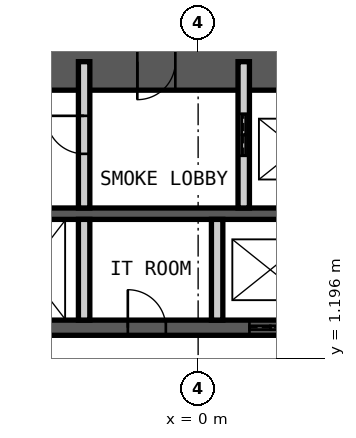
"""IFC4 building model, lengths in metres.
Left out: names, types, materials, properties, quantities, classifications, styles, units other than length and angle.
Written with IfcOpenShell. Run it as: python <this file> out.ifc"""

import sys

from ifc_helpers import new_model, si_unit, direction, frame, frame_2d, origin, place, context, subcontext, project, spatial, rectangle, extrude, element, fill, save


model = new_model("IFC4")
c1 = context("Model", 3, precision=1e-05, world=origin(), true_north=direction((0.0, 1.0)))
c2 = subcontext(c1, "Body", "Model", "MODEL_VIEW")
j1 = project(units=[si_unit("LENGTHUNIT", "METRE"), si_unit("PLANEANGLEUNIT", "RADIAN")], contexts=[c1])
p1 = place(None, origin())
s1 = spatial("IfcSite", under=j1, at=p1, CompositionType="ELEMENT")
p2 = place(p1, origin())
s2 = spatial("IfcBuilding", under=s1, at=p2, CompositionType="ELEMENT")
p3 = place(p2, frame((0.0, 0.0, 62.0)))
s3 = spatial("IfcBuildingStorey", under=s2, at=p3, CompositionType="ELEMENT", Elevation=62.0)
p4 = place(p3, frame((-12.0, 9.0, 0.0), z_axis=(0.0, 0.0, 1.0), x_axis=(1.0, 0.0, 0.0)))
e1 = element("IfcWall", 1, at=p4, inside=s3, PredefinedType="SHEAR", context=c2, shape_type="SweptSolid", body=[
    extrude(rectangle(XDim=24.0, YDim=1.5, at=frame_2d((12.0, 0.0))), origin(), (0.0, 0.0, 1.0), 5.0),
])
p5 = place(p4, frame((10.4, 0.0, 0.0)))
e2 = element("IfcOpeningElement", 2, at=p5, cuts=e1, PredefinedType="OPENING", context=c2, shape_type="SweptSolid", body=[
    extrude(rectangle(XDim=1.0, YDim=2.1, at=frame_2d((0.5, 1.05))), frame((0.0, 0.76, 0.0), z_axis=(0.0, -1.0, 0.0), x_axis=(1.0, 0.0, 0.0)), (0.0, 0.0, 1.0), 1.52),
])
p6 = place(p4, frame((17.6, 0.0, 0.0)))
e3 = element("IfcOpeningElement", 3, at=p6, cuts=e1, PredefinedType="OPENING", context=c2, shape_type="SweptSolid", body=[
    extrude(rectangle(XDim=0.9, YDim=2.1, at=frame_2d((0.45, 1.05))), frame((0.0, 0.76, 0.0), z_axis=(0.0, -1.0, 0.0), x_axis=(1.0, 0.0, 0.0)), (0.0, 0.0, 1.0), 1.52),
])
p7 = place(p4, frame((21.9, 0.0, 0.0)))
e4 = element("IfcOpeningElement", 4, at=p7, cuts=e1, PredefinedType="OPENING", context=c2, shape_type="SweptSolid", body=[
    extrude(rectangle(XDim=0.9, YDim=2.1, at=frame_2d((0.45, 1.05))), frame((0.0, 0.76, 0.0), z_axis=(0.0, -1.0, 0.0), x_axis=(1.0, 0.0, 0.0)), (0.0, 0.0, 1.0), 1.52),
])
p8 = place(p3, frame((-12.0, 5.0, 0.0), z_axis=(0.0, 0.0, 1.0), x_axis=(1.0, 0.0, 0.0)))
e5 = element("IfcWall", 5, at=p8, inside=s3, PredefinedType="SHEAR", context=c2, shape_type="SweptSolid", body=[
    extrude(rectangle(XDim=24.0, YDim=0.3, at=frame_2d((12.0, 0.0))), origin(), (0.0, 0.0, 1.0), 5.0),
])
p9 = place(p3, frame((-12.0, 2.0, 0.0), z_axis=(0.0, 0.0, 1.0), x_axis=(1.0, 0.0, 0.0)))
e6 = element("IfcWall", 6, at=p9, inside=s3, PredefinedType="SHEAR", context=c2, shape_type="SweptSolid", body=[
    extrude(rectangle(XDim=24.0, YDim=0.4, at=frame_2d((12.0, 0.0))), origin(), (0.0, 0.0, 1.0), 5.0),
])
p10 = place(p9, frame((2.4, 0.0, 0.0)))
e7 = element("IfcOpeningElement", 7, at=p10, cuts=e6, PredefinedType="OPENING", context=c2, shape_type="SweptSolid", body=[
    extrude(rectangle(XDim=1.1, YDim=2.1, at=frame_2d((0.55, 1.05))), frame((0.0, 0.21, 0.0), z_axis=(0.0, -1.0, 0.0), x_axis=(1.0, 0.0, 0.0)), (0.0, 0.0, 1.0), 0.42),
])
p11 = place(p9, frame((22.0, 0.0, 0.0)))
e8 = element("IfcOpeningElement", 8, at=p11, cuts=e6, PredefinedType="OPENING", context=c2, shape_type="SweptSolid", body=[
    extrude(rectangle(XDim=1.1, YDim=2.1, at=frame_2d((0.55, 1.05))), frame((0.0, 0.21, 0.0), z_axis=(0.0, -1.0, 0.0), x_axis=(1.0, 0.0, 0.0)), (0.0, 0.0, 1.0), 0.42),
])
p12 = place(p9, frame((10.15, 0.0, 0.0)))
e9 = element("IfcOpeningElement", 9, at=p12, cuts=e6, PredefinedType="OPENING", context=c2, shape_type="SweptSolid", body=[
    extrude(rectangle(XDim=1.0, YDim=2.1, at=frame_2d((0.5, 1.05))), frame((0.0, 0.21, 0.0), z_axis=(0.0, -1.0, 0.0), x_axis=(1.0, 0.0, 0.0)), (0.0, 0.0, 1.0), 0.42),
])
p13 = place(p9, frame((6.7, 0.0, 0.0)))
e10 = element("IfcOpeningElement", 10, at=p13, cuts=e6, PredefinedType="OPENING", context=c2, shape_type="SweptSolid", body=[
    extrude(rectangle(XDim=1.4, YDim=2.4, at=frame_2d((0.7, 1.2))), frame((0.0, 0.21, 0.0), z_axis=(0.0, -1.0, 0.0), x_axis=(1.0, 0.0, 0.0)), (0.0, 0.0, 1.0), 0.42),
])
p14 = place(p9, frame((13.35, 0.0, 0.0)))
e11 = element("IfcOpeningElement", 11, at=p14, cuts=e6, PredefinedType="OPENING", context=c2, shape_type="SweptSolid", body=[
    extrude(rectangle(XDim=1.1, YDim=2.4, at=frame_2d((0.55, 1.2))), frame((0.0, 0.21, 0.0), z_axis=(0.0, -1.0, 0.0), x_axis=(1.0, 0.0, 0.0)), (0.0, 0.0, 1.0), 0.42),
])
p15 = place(p9, frame((16.15, 0.0, 0.0)))
e12 = element("IfcOpeningElement", 12, at=p15, cuts=e6, PredefinedType="OPENING", context=c2, shape_type="SweptSolid", body=[
    extrude(rectangle(XDim=1.1, YDim=2.4, at=frame_2d((0.55, 1.2))), frame((0.0, 0.21, 0.0), z_axis=(0.0, -1.0, 0.0), x_axis=(1.0, 0.0, 0.0)), (0.0, 0.0, 1.0), 0.42),
])
p16 = place(p9, frame((18.95, 0.0, 0.0)))
e13 = element("IfcOpeningElement", 13, at=p16, cuts=e6, PredefinedType="OPENING", context=c2, shape_type="SweptSolid", body=[
    extrude(rectangle(XDim=1.1, YDim=2.4, at=frame_2d((0.55, 1.2))), frame((0.0, 0.21, 0.0), z_axis=(0.0, -1.0, 0.0), x_axis=(1.0, 0.0, 0.0)), (0.0, 0.0, 1.0), 0.42),
])
p17 = place(p3, frame((-3.0, 5.15, 0.0), z_axis=(0.0, 0.0, 1.0), x_axis=(0.0, 1.0, 0.0)))
e14 = element("IfcWall", 14, at=p17, inside=s3, PredefinedType="PARTITIONING", context=c2, shape_type="SweptSolid", body=[
    extrude(rectangle(XDim=3.85, YDim=0.3, at=frame_2d((1.925, 0.0))), origin(), (0.0, 0.0, 1.0), 4.78),
])
p18 = place(p17, frame((1.425, 0.0, 0.0)))
e15 = element("IfcOpeningElement", 15, at=p18, cuts=e14, PredefinedType="OPENING", context=c2, shape_type="SweptSolid", body=[
    extrude(rectangle(XDim=1.0, YDim=2.1, at=frame_2d((0.5, 1.05))), frame((0.0, 0.16, 0.0), z_axis=(0.0, -1.0, 0.0), x_axis=(1.0, 0.0, 0.0)), (0.0, 0.0, 1.0), 0.32),
])
p19 = place(p3, frame((1.2, 5.15, 0.0), z_axis=(0.0, 0.0, 1.0), x_axis=(0.0, 1.0, 0.0)))
e16 = element("IfcWall", 16, at=p19, inside=s3, PredefinedType="PARTITIONING", context=c2, shape_type="SweptSolid", body=[
    extrude(rectangle(XDim=3.85, YDim=0.3, at=frame_2d((1.925, 0.0))), origin(), (0.0, 0.0, 1.0), 4.78),
])
p20 = place(p19, frame((1.375, 0.0, 0.0)))
e17 = element("IfcOpeningElement", 17, at=p20, cuts=e16, PredefinedType="OPENING", context=c2, shape_type="SweptSolid", body=[
    extrude(rectangle(XDim=1.1, YDim=2.4, at=frame_2d((0.55, 1.2))), frame((0.0, 0.16, 0.0), z_axis=(0.0, -1.0, 0.0), x_axis=(1.0, 0.0, 0.0)), (0.0, 0.0, 1.0), 0.32),
])
for number, where, z_axis, x_axis in (
    (18, (-3.0, 2.2, 0.0), (0.0, 0.0, 1.0), (0.0, 1.0, 0.0)),
    (19, (0.5, 2.2, 0.0), (0.0, 0.0, 1.0), (0.0, 1.0, 0.0)),
):
    element("IfcWall", number, at=place(p3, frame(where, z_axis=z_axis, x_axis=x_axis)), inside=s3, PredefinedType="PARTITIONING", context=c2, shape_type="SweptSolid", body=[
        extrude(rectangle(XDim=2.65, YDim=0.3, at=frame_2d((1.325, 0.0))), origin(), (0.0, 0.0, 1.0), 4.78),
    ])
p21 = place(p5, origin())
e20 = element("IfcDoor", 20, at=p21, inside=s3, OperationType="SINGLE_SWING_LEFT", PredefinedType="DOOR", context=c2, shape_type="SweptSolid", body=[
    extrude(rectangle(XDim=1.0, YDim=2.1, at=frame_2d((0.5, 1.05))), frame((0.0, 0.025, 0.0), z_axis=(0.0, -1.0, 0.0), x_axis=(1.0, 0.0, 0.0)), (0.0, 0.0, 1.0), 0.05),
])
fill(e2, e20)
p22 = place(p18, origin())
e21 = element("IfcDoor", 21, at=p22, inside=s3, OperationType="SINGLE_SWING_LEFT", PredefinedType="DOOR", context=c2, shape_type="SweptSolid", body=[
    extrude(rectangle(XDim=1.0, YDim=2.1, at=frame_2d((0.5, 1.05))), frame((0.0, 0.025, 0.0), z_axis=(0.0, -1.0, 0.0), x_axis=(1.0, 0.0, 0.0)), (0.0, 0.0, 1.0), 0.05),
])
fill(e15, e21)
p23 = place(p12, origin())
e22 = element("IfcDoor", 22, at=p23, inside=s3, OperationType="SINGLE_SWING_RIGHT", PredefinedType="DOOR", context=c2, shape_type="SweptSolid", body=[
    extrude(rectangle(XDim=1.0, YDim=2.1, at=frame_2d((0.5, 1.05))), frame((0.0, 0.025, 0.0), z_axis=(0.0, -1.0, 0.0), x_axis=(1.0, 0.0, 0.0)), (0.0, 0.0, 1.0), 0.05),
])
fill(e9, e22)
p24 = place(p20, origin())
e23 = element("IfcDoor", 23, at=p24, inside=s3, OperationType="DOUBLE_DOOR_SLIDING", PredefinedType="DOOR", context=c2, shape_type="SweptSolid", body=[
    extrude(rectangle(XDim=1.1, YDim=2.4, at=frame_2d((0.55, 1.2))), frame((0.0, 0.025, 0.0), z_axis=(0.0, -1.0, 0.0), x_axis=(1.0, 0.0, 0.0)), (0.0, 0.0, 1.0), 0.05),
])
fill(e17, e23)
p25 = place(p14, origin())
e24 = element("IfcDoor", 24, at=p25, inside=s3, OperationType="DOUBLE_DOOR_SLIDING", PredefinedType="DOOR", context=c2, shape_type="SweptSolid", body=[
    extrude(rectangle(XDim=1.1, YDim=2.4, at=frame_2d((0.55, 1.2))), frame((0.0, 0.025, 0.0), z_axis=(0.0, -1.0, 0.0), x_axis=(1.0, 0.0, 0.0)), (0.0, 0.0, 1.0), 0.05),
])
fill(e11, e24)
save(model, sys.argv[1])
